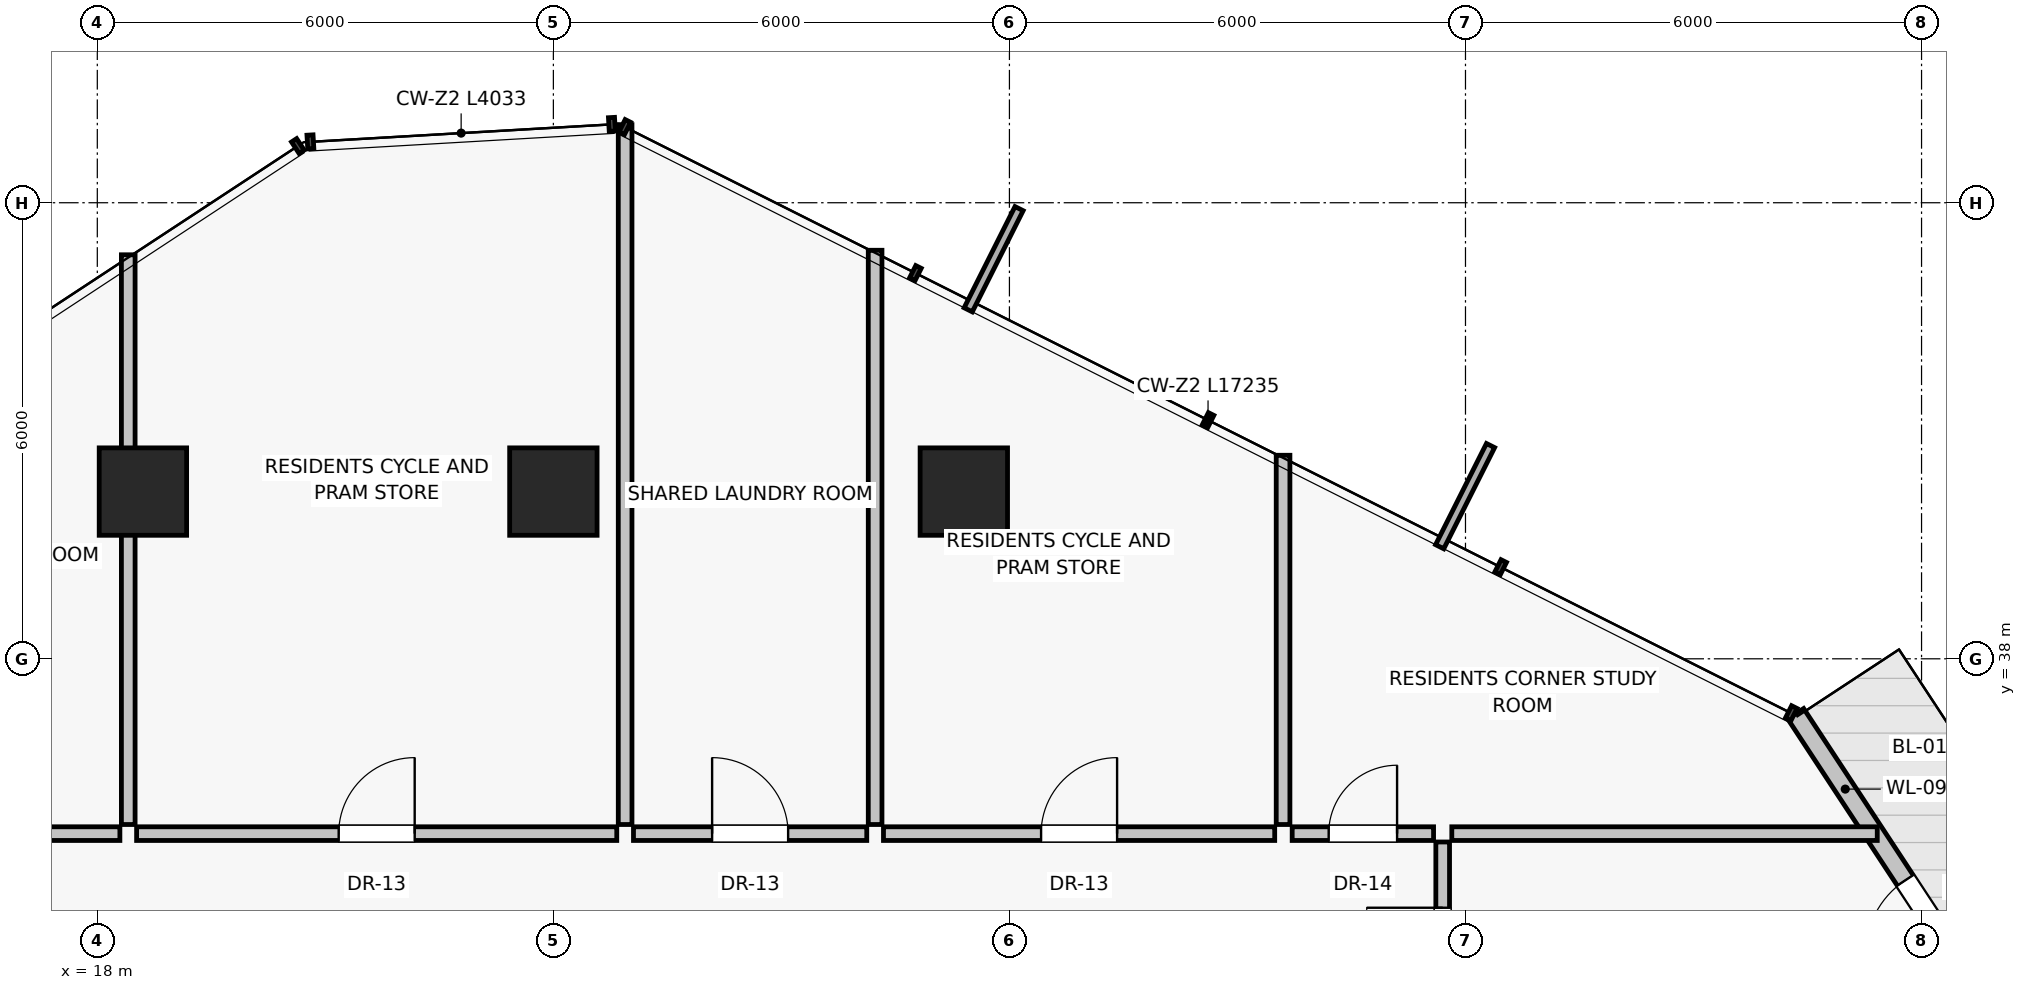
"""IFC4 building model, lengths in metres.
Left out: names, types, materials, properties, quantities, classifications, styles, units other than length and angle.
Written with IfcOpenShell. Run it as: python <this file> out.ifc"""

import sys

from ifc_helpers import new_model, si_unit, direction, frame, frame_2d, origin, origin_2d, place, context, subcontext, project, spatial, rectangle, extrude, source, transform, mapped, element, fill, save


model = new_model("IFC4")
c1 = context("Model", 3, precision=1e-05, world=origin(), true_north=direction((0.0, 1.0)))
c2 = subcontext(c1, "Body", "Model", "MODEL_VIEW")
j1 = project(units=[si_unit("LENGTHUNIT", "METRE"), si_unit("PLANEANGLEUNIT", "RADIAN")], contexts=[c1])
p1 = place(None, origin())
s1 = spatial("IfcSite", under=j1, at=p1, CompositionType="ELEMENT")
p2 = place(p1, origin())
s2 = spatial("IfcBuilding", under=s1, at=p2, CompositionType="ELEMENT")
p3 = place(p2, frame((0.0, 0.0, 139.25)))
s3 = spatial("IfcBuildingStorey", under=s2, at=p3, CompositionType="ELEMENT", Elevation=139.25)
for number, where, z_axis, x_axis in (
    (1, (29.4, 40.2, 0.0), (0.0, 0.0, 1.0), (1.0, 0.0, 0.0)),
    (2, (24.0, 40.2, 0.0), (0.0, 0.0, 1.0), (1.0, 0.0, 0.0)),
    (3, (18.6, 40.2, 0.0), (0.0, 0.0, 1.0), (1.0, 0.0, 0.0)),
):
    element("IfcColumn", number, at=place(p3, frame(where, z_axis=z_axis, x_axis=x_axis)), inside=s3, PredefinedType="COLUMN", context=c2, shape_type="SweptSolid", body=[
        extrude(rectangle(XDim=1.15, YDim=1.15, at=origin_2d()), origin(), (0.0, 0.0, 1.0), 3.25),
    ])
p4 = place(p3, frame((42.67, 33.74, 0.0), z_axis=(0.0, 0.0, 1.0), x_axis=(-0.54932518159, 0.835608667303, 0.0)))
e4 = element("IfcWall", 4, at=p4, inside=s3, PredefinedType="SOLIDWALL", context=c2, shape_type="SweptSolid", body=[
    extrude(rectangle(XDim=4.233, YDim=0.25, at=frame_2d((2.117, 0.0))), origin(), (0.0, 0.0, 1.0), 3.0),
])
p5 = place(p4, frame((0.46, 0.0, 0.0)))
e5 = element("IfcOpeningElement", 5, at=p5, cuts=e4, PredefinedType="OPENING", context=c2, shape_type="SweptSolid", body=[
    extrude(rectangle(XDim=1.15, YDim=2.25, at=frame_2d((0.575, 1.125))), frame((0.0, 0.135, 0.0), z_axis=(0.0, -1.0, 0.0), x_axis=(1.0, 0.0, 0.0)), (0.0, 0.0, 1.0), 0.27),
])
p6 = place(p3, frame((33.6, 35.82, 0.0), z_axis=(0.0, 0.0, 1.0), x_axis=(0.0, 1.0, 0.0)))
e6 = element("IfcWall", 6, at=p6, inside=s3, PredefinedType="PARTITIONING", context=c2, shape_type="SweptSolid", body=[
    extrude(rectangle(XDim=4.858, YDim=0.18, at=frame_2d((2.429, 0.0))), origin(), (0.0, 0.0, 1.0), 3.0),
])
p7 = place(p3, frame((14.51, 35.7, 0.0), z_axis=(0.0, 0.0, 1.0), x_axis=(1.0, 0.0, 0.0)))
e7 = element("IfcWall", 7, at=p7, inside=s3, PredefinedType="PARTITIONING", context=c2, shape_type="SweptSolid", body=[
    extrude(rectangle(XDim=3.787, YDim=0.18, at=frame_2d((1.894, 0.0))), origin(), (0.0, 0.0, 1.0), 2.58),
])
p8 = place(p7, frame((1.394, 0.0, 0.0)))
e8 = element("IfcOpeningElement", 8, at=p8, cuts=e7, PredefinedType="OPENING", context=c2, shape_type="SweptSolid", body=[
    extrude(rectangle(XDim=1.0, YDim=2.01, at=frame_2d((0.5, 1.005))), frame((0.0, 0.1, 0.0), z_axis=(0.0, -1.0, 0.0), x_axis=(1.0, 0.0, 0.0)), (0.0, 0.0, 1.0), 0.2),
])
p9 = place(p3, frame((18.517, 35.7, 0.0), z_axis=(0.0, 0.0, 1.0), x_axis=(1.0, 0.0, 0.0)))
e9 = element("IfcWall", 9, at=p9, inside=s3, PredefinedType="PARTITIONING", context=c2, shape_type="SweptSolid", body=[
    extrude(rectangle(XDim=6.317, YDim=0.18, at=frame_2d((3.158, 0.0))), origin(), (0.0, 0.0, 1.0), 2.58),
])
p10 = place(p9, frame((2.658, 0.0, 0.0)))
e10 = element("IfcOpeningElement", 10, at=p10, cuts=e9, PredefinedType="OPENING", context=c2, shape_type="SweptSolid", body=[
    extrude(rectangle(XDim=1.0, YDim=2.01, at=frame_2d((0.5, 1.005))), frame((0.0, 0.1, 0.0), z_axis=(0.0, -1.0, 0.0), x_axis=(1.0, 0.0, 0.0)), (0.0, 0.0, 1.0), 0.2),
])
p11 = place(p3, frame((18.407, 35.82, 0.0), z_axis=(0.0, 0.0, 1.0), x_axis=(0.0, 1.0, 0.0)))
e11 = element("IfcWall", 11, at=p11, inside=s3, PredefinedType="PARTITIONING", context=c2, shape_type="SweptSolid", body=[
    extrude(rectangle(XDim=7.495, YDim=0.18, at=frame_2d((3.748, 0.0))), origin(), (0.0, 0.0, 1.0), 2.378),
])
p12 = place(p3, frame((24.944, 35.82, 0.0), z_axis=(0.0, 0.0, 1.0), x_axis=(0.0, 1.0, 0.0)))
e12 = element("IfcWall", 12, at=p12, inside=s3, PredefinedType="PARTITIONING", context=c2, shape_type="SweptSolid", body=[
    extrude(rectangle(XDim=9.207, YDim=0.18, at=frame_2d((4.604, 0.0))), origin(), (0.0, 0.0, 1.0), 3.0),
])
p13 = place(p3, frame((25.054, 35.7, 0.0), z_axis=(0.0, 0.0, 1.0), x_axis=(1.0, 0.0, 0.0)))
e13 = element("IfcWall", 13, at=p13, inside=s3, PredefinedType="PARTITIONING", context=c2, shape_type="SweptSolid", body=[
    extrude(rectangle(XDim=3.069, YDim=0.18, at=frame_2d((1.535, 0.0))), origin(), (0.0, 0.0, 1.0), 2.58),
])
p14 = place(p13, frame((1.034, 0.0, 0.0)))
e14 = element("IfcOpeningElement", 14, at=p14, cuts=e13, PredefinedType="OPENING", context=c2, shape_type="SweptSolid", body=[
    extrude(rectangle(XDim=1.0, YDim=2.01, at=frame_2d((0.5, 1.005))), frame((0.0, 0.1, 0.0), z_axis=(0.0, -1.0, 0.0), x_axis=(1.0, 0.0, 0.0)), (0.0, 0.0, 1.0), 0.2),
])
p15 = place(p3, frame((28.343, 35.7, 0.0), z_axis=(0.0, 0.0, 1.0), x_axis=(1.0, 0.0, 0.0)))
e15 = element("IfcWall", 15, at=p15, inside=s3, PredefinedType="PARTITIONING", context=c2, shape_type="SweptSolid", body=[
    extrude(rectangle(XDim=5.147, YDim=0.18, at=frame_2d((2.573, 0.0))), origin(), (0.0, 0.0, 1.0), 2.58),
])
p16 = place(p15, frame((2.073, 0.0, 0.0)))
e16 = element("IfcOpeningElement", 16, at=p16, cuts=e15, PredefinedType="OPENING", context=c2, shape_type="SweptSolid", body=[
    extrude(rectangle(XDim=1.0, YDim=2.01, at=frame_2d((0.5, 1.005))), frame((0.0, 0.1, 0.0), z_axis=(0.0, -1.0, 0.0), x_axis=(1.0, 0.0, 0.0)), (0.0, 0.0, 1.0), 0.2),
])
p17 = place(p3, frame((28.233, 35.82, 0.0), z_axis=(0.0, 0.0, 1.0), x_axis=(0.0, 1.0, 0.0)))
e17 = element("IfcWall", 17, at=p17, inside=s3, PredefinedType="PARTITIONING", context=c2, shape_type="SweptSolid", body=[
    extrude(rectangle(XDim=7.555, YDim=0.18, at=frame_2d((3.777, 0.0))), origin(), (0.0, 0.0, 1.0), 3.0),
])
p18 = place(p3, frame((35.82, 35.7, 0.0), z_axis=(0.0, 0.0, 1.0), x_axis=(1.0, 0.0, 0.0)))
e18 = element("IfcWall", 18, at=p18, inside=s3, PredefinedType="PARTITIONING", context=c2, shape_type="SweptSolid", body=[
    extrude(rectangle(XDim=5.597, YDim=0.18, at=frame_2d((2.799, 0.0))), origin(), (0.0, 0.0, 1.0), 3.0),
])
p19 = place(p3, frame((35.7, 32.86, 0.0), z_axis=(0.0, 0.0, 1.0), x_axis=(0.0, 1.0, 0.0)))
e19 = element("IfcWall", 19, at=p19, inside=s3, PredefinedType="PARTITIONING", context=c2, shape_type="SweptSolid", body=[
    extrude(rectangle(XDim=2.73, YDim=0.18, at=frame_2d((1.365, 0.0))), origin(), (0.0, 0.0, 1.0), 3.0),
])
p20 = place(p19, frame((0.865, 0.0, 0.0)))
e20 = element("IfcOpeningElement", 20, at=p20, cuts=e19, PredefinedType="OPENING", context=c2, shape_type="SweptSolid", body=[
    extrude(rectangle(XDim=1.0, YDim=2.01, at=frame_2d((0.5, 1.005))), frame((0.0, 0.1, 0.0), z_axis=(0.0, -1.0, 0.0), x_axis=(1.0, 0.0, 0.0)), (0.0, 0.0, 1.0), 0.2),
])
p21 = place(p3, frame((33.72, 35.7, 0.0), z_axis=(0.0, 0.0, 1.0), x_axis=(1.0, 0.0, 0.0)))
e21 = element("IfcWall", 21, at=p21, inside=s3, PredefinedType="PARTITIONING", context=c2, shape_type="SweptSolid", body=[
    extrude(rectangle(XDim=1.86, YDim=0.18, at=frame_2d((0.93, 0.0))), origin(), (0.0, 0.0, 1.0), 3.0),
])
p22 = place(p21, frame((0.48, 0.0, 0.0)))
e22 = element("IfcOpeningElement", 22, at=p22, cuts=e21, PredefinedType="OPENING", context=c2, shape_type="SweptSolid", body=[
    extrude(rectangle(XDim=0.9, YDim=2.01, at=frame_2d((0.45, 1.005))), frame((0.0, 0.1, 0.0), z_axis=(0.0, -1.0, 0.0), x_axis=(1.0, 0.0, 0.0)), (0.0, 0.0, 1.0), 0.2),
])
m1 = source(origin(), c2, "Body", "SweptSolid", [
    extrude(rectangle(XDim=1.15, YDim=2.25, at=frame_2d((0.575, 1.125))), frame((0.0, 0.025, 0.0), z_axis=(0.0, -1.0, 0.0), x_axis=(1.0, 0.0, 0.0)), (0.0, 0.0, 1.0), 0.05),
])
p23 = place(p5, frame((1.15, 0.0, 0.0), z_axis=(0.0, 0.0, 1.0), x_axis=(-1.0, 0.0, 0.0)))
e23 = element("IfcDoor", 23, at=p23, inside=s3, OperationType="SINGLE_SWING_LEFT", PredefinedType="DOOR", context=c2, shape_type="MappedRepresentation", body=[
    mapped(m1, transform((0.0, 0.0, 0.0), scale=1.0)),
])
fill(e5, e23)
m2 = source(origin(), c2, "Body", "SweptSolid", [
    extrude(rectangle(XDim=1.0, YDim=2.01, at=frame_2d((0.5, 1.005))), frame((0.0, 0.025, 0.0), z_axis=(0.0, -1.0, 0.0), x_axis=(1.0, 0.0, 0.0)), (0.0, 0.0, 1.0), 0.05),
])
p24 = place(p10, origin())
e24 = element("IfcDoor", 24, at=p24, inside=s3, OperationType="SINGLE_SWING_RIGHT", PredefinedType="DOOR", context=c2, shape_type="MappedRepresentation", body=[
    mapped(m2, transform((0.0, 0.0, 0.0), scale=1.0)),
])
fill(e10, e24)
p25 = place(p14, origin())
e25 = element("IfcDoor", 25, at=p25, inside=s3, OperationType="SINGLE_SWING_LEFT", PredefinedType="DOOR", context=c2, shape_type="MappedRepresentation", body=[
    mapped(m2, transform((0.0, 0.0, 0.0), scale=1.0)),
])
fill(e14, e25)
p26 = place(p16, origin())
e26 = element("IfcDoor", 26, at=p26, inside=s3, OperationType="SINGLE_SWING_RIGHT", PredefinedType="DOOR", context=c2, shape_type="MappedRepresentation", body=[
    mapped(m2, transform((0.0, 0.0, 0.0), scale=1.0)),
])
fill(e16, e26)
p27 = place(p20, origin())
e27 = element("IfcDoor", 27, at=p27, inside=s3, OperationType="SINGLE_SWING_RIGHT", PredefinedType="DOOR", context=c2, shape_type="MappedRepresentation", body=[
    mapped(m2, transform((0.0, 0.0, 0.0), scale=1.0)),
])
fill(e20, e27)
m3 = source(origin(), c2, "Body", "SweptSolid", [
    extrude(rectangle(XDim=0.9, YDim=2.01, at=frame_2d((0.45, 1.005))), frame((0.0, 0.025, 0.0), z_axis=(0.0, -1.0, 0.0), x_axis=(1.0, 0.0, 0.0)), (0.0, 0.0, 1.0), 0.05),
])
p28 = place(p22, origin())
e28 = element("IfcDoor", 28, at=p28, inside=s3, OperationType="SINGLE_SWING_RIGHT", PredefinedType="DOOR", context=c2, shape_type="MappedRepresentation", body=[
    mapped(m3, transform((0.0, 0.0, 0.0), scale=1.0)),
])
fill(e22, e28)
save(model, sys.argv[1])
